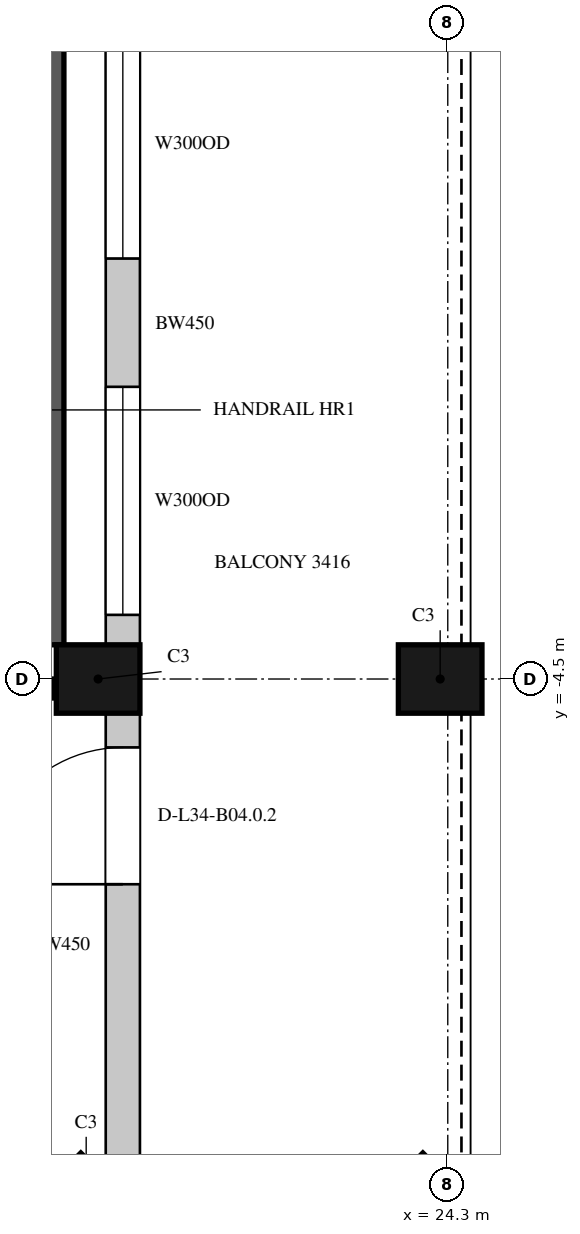
"""IFC4 building model, lengths in metres.
Left out: names, types, materials, properties, quantities, classifications, styles, units other than length and angle.
Written with IfcOpenShell. Run it as: python <this file> out.ifc"""

import sys

from ifc_helpers import new_model, si_unit, direction, frame, frame_2d, origin, origin_2d, place, context, subcontext, project, spatial, rectangle, extrude, element, fill, save


model = new_model("IFC4")
c1 = context("Model", 3, precision=1e-05, world=origin(), true_north=direction((0.0, 1.0)))
c2 = subcontext(c1, "Body", "Model", "MODEL_VIEW")
j1 = project(units=[si_unit("LENGTHUNIT", "METRE"), si_unit("PLANEANGLEUNIT", "RADIAN")], contexts=[c1])
p1 = place(None, origin())
s1 = spatial("IfcSite", under=j1, at=p1, CompositionType="ELEMENT")
p2 = place(p1, origin())
s2 = spatial("IfcBuilding", under=s1, at=p2, CompositionType="ELEMENT")
p3 = place(p2, frame((0.0, 0.0, 160.5)))
s3 = spatial("IfcBuildingStorey", under=s2, at=p3, CompositionType="ELEMENT", Elevation=160.5)
for number, where, z_axis, x_axis in (
    (1, (19.543, -11.443, 0.0), (0.0, 0.0, 1.0), (0.707, 0.707, 0.0)),
    (2, (19.7, -4.5, 0.0), (0.0, 0.0, 1.0), (0.0, 1.0, 0.0)),
    (3, (24.043, -11.443, 0.0), (0.0, 0.0, 1.0), (0.707, 0.707, 0.0)),
    (4, (24.2, -4.5, 0.0), (0.0, 0.0, 1.0), (0.0, 1.0, 0.0)),
):
    element("IfcColumn", number, at=place(p3, frame(where, z_axis=z_axis, x_axis=x_axis)), inside=s3, PredefinedType="COLUMN", context=c2, shape_type="SweptSolid", body=[
        extrude(rectangle(XDim=0.9, YDim=1.1, at=origin_2d()), origin(), (0.0, 0.0, 1.0), 4.1),
    ])
p4 = place(p3, frame((20.025, -11.064, 0.0), z_axis=(0.0, 0.0, 1.0), x_axis=(0.0, 1.0, 0.0)))
e5 = element("IfcWall", 5, at=p4, inside=s3, PredefinedType="SOLIDWALL", context=c2, shape_type="SweptSolid", body=[
    extrude(rectangle(XDim=6.114, YDim=0.45, at=frame_2d((3.057, 0.0))), origin(), (0.0, 0.0, 1.0), 3.8),
])
p5 = place(p4, frame((3.864, 0.0, 0.0)))
e6 = element("IfcOpeningElement", 6, at=p5, cuts=e5, PredefinedType="OPENING", context=c2, shape_type="SweptSolid", body=[
    extrude(rectangle(XDim=1.8, YDim=2.4, at=frame_2d((0.9, 1.2))), frame((0.0, 0.235, 0.0), z_axis=(0.0, -1.0, 0.0), x_axis=(1.0, 0.0, 0.0)), (0.0, 0.0, 1.0), 0.47),
])
p6 = place(p3, frame((20.025, -4.05, 0.0), z_axis=(0.0, 0.0, 1.0), x_axis=(0.0, 1.0, 0.0)))
e7 = element("IfcWall", 7, at=p6, inside=s3, PredefinedType="SOLIDWALL", context=c2, shape_type="SweptSolid", body=[
    extrude(rectangle(XDim=8.439, YDim=0.45, at=frame_2d((4.219, 0.0))), origin(), (0.0, 0.0, 1.0), 3.8),
])
p7 = place(p6, frame((0.394, 0.0, 1.05)))
e8 = element("IfcOpeningElement", 8, at=p7, cuts=e7, PredefinedType="OPENING", context=c2, shape_type="SweptSolid", body=[
    extrude(rectangle(XDim=3.0, YDim=2.4, at=frame_2d((1.5, 1.2))), frame((0.0, 0.235, 0.0), z_axis=(0.0, -1.0, 0.0), x_axis=(1.0, 0.0, 0.0)), (0.0, 0.0, 1.0), 0.47),
])
p8 = place(p6, frame((5.082, 0.0, 1.05)))
e9 = element("IfcOpeningElement", 9, at=p8, cuts=e7, PredefinedType="OPENING", context=c2, shape_type="SweptSolid", body=[
    extrude(rectangle(XDim=3.0, YDim=2.4, at=frame_2d((1.5, 1.2))), frame((0.0, 0.235, 0.0), z_axis=(0.0, -1.0, 0.0), x_axis=(1.0, 0.0, 0.0)), (0.0, 0.0, 1.0), 0.47),
])
p9 = place(p3, frame((21.1, -5.1, 0.0), z_axis=(0.0, 0.0, 1.0), x_axis=(0.0, 1.0, 0.0)))
e10 = element("IfcWall", 10, at=p9, inside=s3, PredefinedType="SOLIDWALL", context=c2, shape_type="SweptSolid", body=[
    extrude(rectangle(XDim=3.583, YDim=0.45, at=frame_2d((1.792, 0.0))), origin(), (0.0, 0.0, 1.0), 0.6),
])
p10 = place(p3, frame((21.1, -0.617, 0.0), z_axis=(0.0, 0.0, 1.0), x_axis=(0.0, 1.0, 0.0)))
e11 = element("IfcWall", 11, at=p10, inside=s3, PredefinedType="SOLIDWALL", context=c2, shape_type="SweptSolid", body=[
    extrude(rectangle(XDim=2.567, YDim=0.45, at=frame_2d((1.283, 0.0))), origin(), (0.0, 0.0, 1.0), 0.6),
])
p11 = place(p3, frame((14.675, -4.625, 0.0), z_axis=(0.0, 0.0, 1.0), x_axis=(1.0, 0.0, 0.0)))
e12 = element("IfcWall", 12, at=p11, inside=s3, PredefinedType="SHEAR", context=c2, shape_type="SweptSolid", body=[
    extrude(rectangle(XDim=4.45, YDim=0.25, at=frame_2d((2.225, 0.0))), origin(), (0.0, 0.0, 1.0), 3.8),
])
p12 = place(p3, frame((19.125, -4.05, 0.0), z_axis=(0.0, 0.0, 1.0), x_axis=(0.0, 1.0, 0.0)))
e13 = element("IfcWall", 13, at=p12, inside=s3, PredefinedType="SHEAR", context=c2, shape_type="SweptSolid", body=[
    extrude(rectangle(XDim=8.477, YDim=0.25, at=frame_2d((4.238, 0.0))), origin(), (0.0, 0.0, 1.0), 3.8),
])
p13 = place(p5, origin())
e14 = element("IfcDoor", 14, at=p13, inside=s3, OperationType="SLIDING_TO_LEFT", PredefinedType="DOOR", context=c2, shape_type="SweptSolid", body=[
    extrude(rectangle(XDim=1.8, YDim=2.4, at=frame_2d((0.9, 1.2))), frame((0.0, 0.13, 0.0), z_axis=(0.0, -1.0, 0.0), x_axis=(1.0, 0.0, 0.0)), (0.0, 0.0, 1.0), 0.05),
])
fill(e6, e14)
p14 = place(p7, origin())
e15 = element("IfcWindow", 15, at=p14, inside=s3, PartitioningType="SINGLE_PANEL", PredefinedType="WINDOW", context=c2, shape_type="SweptSolid", body=[
    extrude(rectangle(XDim=3.0, YDim=2.4, at=frame_2d((1.5, 1.2))), frame((0.0, 0.135, 0.0), z_axis=(0.0, -1.0, 0.0), x_axis=(1.0, 0.0, 0.0)), (0.0, 0.0, 1.0), 0.06),
])
fill(e8, e15)
p15 = place(p8, origin())
e16 = element("IfcWindow", 16, at=p15, inside=s3, PartitioningType="SINGLE_PANEL", PredefinedType="WINDOW", context=c2, shape_type="SweptSolid", body=[
    extrude(rectangle(XDim=3.0, YDim=2.4, at=frame_2d((1.5, 1.2))), frame((0.0, 0.135, 0.0), z_axis=(0.0, -1.0, 0.0), x_axis=(1.0, 0.0, 0.0)), (0.0, 0.0, 1.0), 0.06),
])
fill(e9, e16)
save(model, sys.argv[1])
